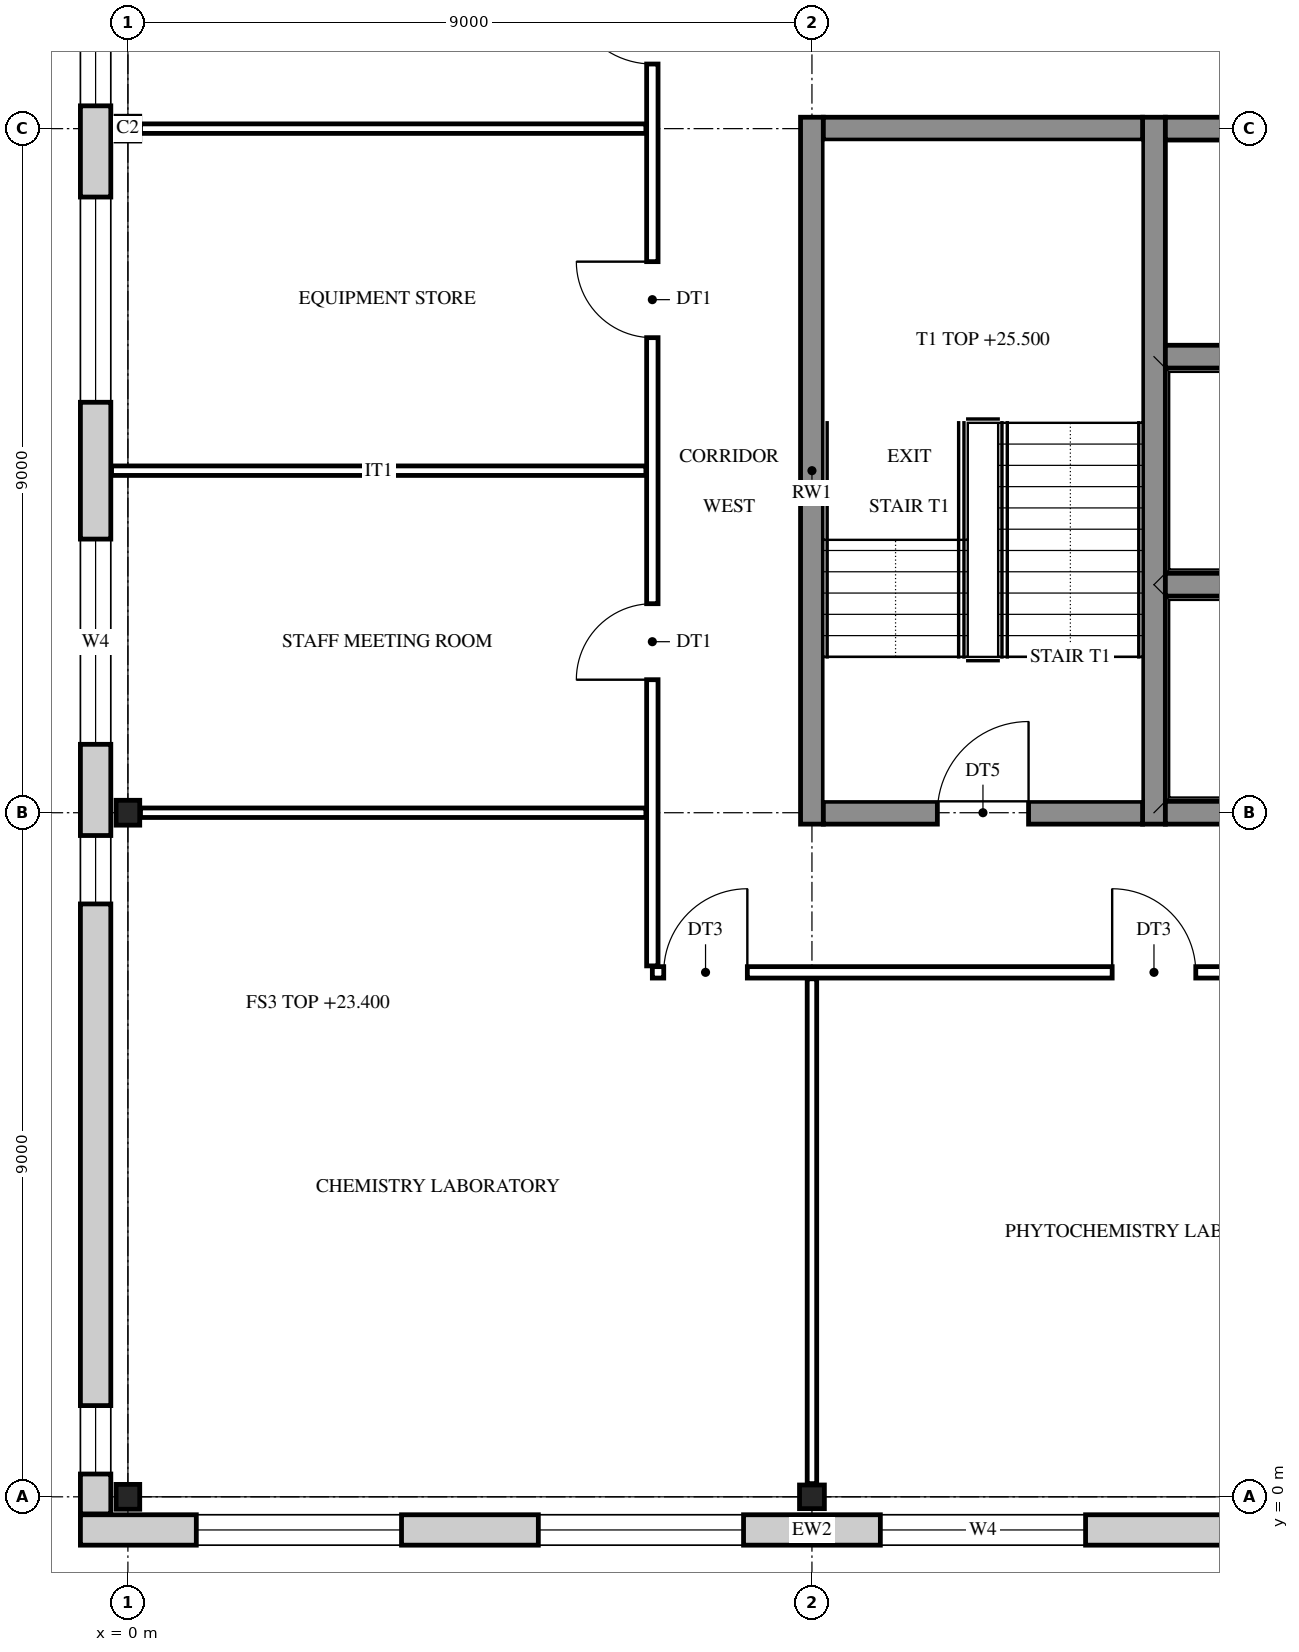
"""IFC4 building model, lengths in metres.
Left out: names, types, materials, properties, quantities, classifications, styles, units other than length and angle.
Written with IfcOpenShell. Run it as: python <this file> out.ifc"""

import sys

from ifc_helpers import new_model, si_unit, direction, frame, frame_2d, origin, origin_2d, place, context, subcontext, project, spatial, rectangle, i_section, extrude, element, fill, save


model = new_model("IFC4")
c1 = context("Model", 3, precision=1e-05, world=origin(), true_north=direction((0.0, 1.0)))
c2 = subcontext(c1, "Body", "Model", "MODEL_VIEW")
j1 = project(units=[si_unit("LENGTHUNIT", "METRE"), si_unit("PLANEANGLEUNIT", "RADIAN")], contexts=[c1])
p1 = place(None, origin())
s1 = spatial("IfcSite", under=j1, at=p1, CompositionType="ELEMENT")
p2 = place(p1, origin())
s2 = spatial("IfcBuilding", under=s1, at=p2, CompositionType="ELEMENT")
p3 = place(p2, frame((0.0, 0.0, 23.4)))
s3 = spatial("IfcBuildingStorey", under=s2, at=p3, CompositionType="ELEMENT", Elevation=23.4)
for number, where, z_axis, x_axis in (
    (1, (0.0, 0.0, 0.0), (0.0, 0.0, 1.0), (1.0, 0.0, 0.0)),
    (2, (0.0, 9.0, 0.0), (0.0, 0.0, 1.0), (1.0, 0.0, 0.0)),
    (3, (0.0, 18.0, 0.0), (0.0, 0.0, 1.0), (1.0, 0.0, 0.0)),
    (4, (9.0, 0.0, 0.0), (0.0, 0.0, 1.0), (0.0, 1.0, 0.0)),
):
    element("IfcColumn", number, at=place(p3, frame(where, z_axis=z_axis, x_axis=x_axis)), inside=s3, PredefinedType="COLUMN", context=c2, shape_type="SweptSolid", body=[
        extrude(i_section(OverallWidth=0.311, OverallDepth=0.327, WebThickness=0.016, FlangeThickness=0.025, FilletRadius=0.017, at=origin_2d()), origin(), (0.0, 0.0, 1.0), 4.2),
    ])
for number, where, z_axis, x_axis in (
    (5, (9.0, 8.85, 0.0), (0.0, 0.0, 1.0), (0.0, 1.0, 0.0)),
    (6, (13.5, 8.85, 0.0), (0.0, 0.0, 1.0), (0.0, 1.0, 0.0)),
):
    element("IfcWall", number, at=place(p3, frame(where, z_axis=z_axis, x_axis=x_axis)), inside=s3, PredefinedType="SHEAR", context=c2, shape_type="SweptSolid", body=[
        extrude(rectangle(XDim=9.3, YDim=0.3, at=frame_2d((4.65, 0.0))), origin(), (0.0, 0.0, 1.0), 4.2),
    ])
p4 = place(p3, frame((9.15, 9.0, 0.0), z_axis=(0.0, 0.0, 1.0), x_axis=(1.0, 0.0, 0.0)))
e7 = element("IfcWall", 7, at=p4, inside=s3, PredefinedType="SHEAR", context=c2, shape_type="SweptSolid", body=[
    extrude(rectangle(XDim=4.2, YDim=0.3, at=frame_2d((2.1, 0.0))), origin(), (0.0, 0.0, 1.0), 4.2),
])
p5 = place(p4, frame((1.5, 0.0, 0.0)))
e8 = element("IfcOpeningElement", 8, at=p5, cuts=e7, PredefinedType="OPENING", context=c2, shape_type="SweptSolid", body=[
    extrude(rectangle(XDim=1.2, YDim=2.1, at=frame_2d((0.6, 1.05))), frame((0.0, 0.16, 0.0), z_axis=(0.0, -1.0, 0.0), x_axis=(1.0, 0.0, 0.0)), (0.0, 0.0, 1.0), 0.32),
])
for number, where, z_axis, x_axis in (
    (9, (13.65, 9.0, 0.0), (0.0, 0.0, 1.0), (1.0, 0.0, 0.0)),
    (10, (13.65, 12.0, 0.0), (0.0, 0.0, 1.0), (1.0, 0.0, 0.0)),
    (11, (13.65, 15.0, 0.0), (0.0, 0.0, 1.0), (1.0, 0.0, 0.0)),
):
    element("IfcWall", number, at=place(p3, frame(where, z_axis=z_axis, x_axis=x_axis)), inside=s3, PredefinedType="SHEAR", context=c2, shape_type="SweptSolid", body=[
        extrude(rectangle(XDim=2.7, YDim=0.3, at=frame_2d((1.35, 0.0))), origin(), (0.0, 0.0, 1.0), 4.2),
    ])
p6 = place(p3, frame((9.15, 18.0, 0.0), z_axis=(0.0, 0.0, 1.0), x_axis=(1.0, 0.0, 0.0)))
e12 = element("IfcWall", 12, at=p6, inside=s3, PredefinedType="SHEAR", context=c2, shape_type="SweptSolid", body=[
    extrude(rectangle(XDim=4.2, YDim=0.3, at=frame_2d((2.1, 0.0))), origin(), (0.0, 0.0, 1.0), 4.2),
])
p7 = place(p3, frame((13.65, 18.0, 0.0), z_axis=(0.0, 0.0, 1.0), x_axis=(1.0, 0.0, 0.0)))
e13 = element("IfcWall", 13, at=p7, inside=s3, PredefinedType="SHEAR", context=c2, shape_type="SweptSolid", body=[
    extrude(rectangle(XDim=2.7, YDim=0.3, at=frame_2d((1.35, 0.0))), origin(), (0.0, 0.0, 1.0), 4.2),
])
p8 = place(p3, frame((32.125, -0.436, 0.0), z_axis=(0.0, 0.0, 1.0), x_axis=(-1.0, 0.0, 0.0)))
e14 = element("IfcWall", 14, at=p8, inside=s3, PredefinedType="STANDARD", context=c2, shape_type="SweptSolid", body=[
    extrude(rectangle(XDim=32.75, YDim=0.4, at=frame_2d((16.375, 0.0))), origin(), (0.0, 0.0, 1.0), 4.2),
])
p9 = place(p8, frame((28.525, 0.0, 0.9)))
e15 = element("IfcOpeningElement", 15, at=p9, cuts=e14, PredefinedType="OPENING", context=c2, shape_type="SweptSolid", body=[
    extrude(rectangle(XDim=2.7, YDim=2.5, at=frame_2d((1.35, 1.25))), frame((0.0, 0.21, 0.0), z_axis=(0.0, -1.0, 0.0), x_axis=(1.0, 0.0, 0.0)), (0.0, 0.0, 1.0), 0.42),
])
p10 = place(p8, frame((24.025, 0.0, 0.9)))
e16 = element("IfcOpeningElement", 16, at=p10, cuts=e14, PredefinedType="OPENING", context=c2, shape_type="SweptSolid", body=[
    extrude(rectangle(XDim=2.7, YDim=2.5, at=frame_2d((1.35, 1.25))), frame((0.0, 0.21, 0.0), z_axis=(0.0, -1.0, 0.0), x_axis=(1.0, 0.0, 0.0)), (0.0, 0.0, 1.0), 0.42),
])
p11 = place(p8, frame((19.525, 0.0, 0.9)))
e17 = element("IfcOpeningElement", 17, at=p11, cuts=e14, PredefinedType="OPENING", context=c2, shape_type="SweptSolid", body=[
    extrude(rectangle(XDim=2.7, YDim=2.5, at=frame_2d((1.35, 1.25))), frame((0.0, 0.21, 0.0), z_axis=(0.0, -1.0, 0.0), x_axis=(1.0, 0.0, 0.0)), (0.0, 0.0, 1.0), 0.42),
])
p12 = place(p8, frame((15.025, 0.0, 0.9)))
e18 = element("IfcOpeningElement", 18, at=p12, cuts=e14, PredefinedType="OPENING", context=c2, shape_type="SweptSolid", body=[
    extrude(rectangle(XDim=2.7, YDim=2.5, at=frame_2d((1.35, 1.25))), frame((0.0, 0.21, 0.0), z_axis=(0.0, -1.0, 0.0), x_axis=(1.0, 0.0, 0.0)), (0.0, 0.0, 1.0), 0.42),
])
p13 = place(p8, frame((10.525, 0.0, 0.9)))
e19 = element("IfcOpeningElement", 19, at=p13, cuts=e14, PredefinedType="OPENING", context=c2, shape_type="SweptSolid", body=[
    extrude(rectangle(XDim=2.7, YDim=2.5, at=frame_2d((1.35, 1.25))), frame((0.0, 0.21, 0.0), z_axis=(0.0, -1.0, 0.0), x_axis=(1.0, 0.0, 0.0)), (0.0, 0.0, 1.0), 0.42),
])
p14 = place(p8, frame((6.025, 0.0, 0.9)))
e20 = element("IfcOpeningElement", 20, at=p14, cuts=e14, PredefinedType="OPENING", context=c2, shape_type="SweptSolid", body=[
    extrude(rectangle(XDim=2.7, YDim=2.5, at=frame_2d((1.35, 1.25))), frame((0.0, 0.21, 0.0), z_axis=(0.0, -1.0, 0.0), x_axis=(1.0, 0.0, 0.0)), (0.0, 0.0, 1.0), 0.42),
])
p15 = place(p8, frame((1.525, 0.0, 0.9)))
e21 = element("IfcOpeningElement", 21, at=p15, cuts=e14, PredefinedType="OPENING", context=c2, shape_type="SweptSolid", body=[
    extrude(rectangle(XDim=2.7, YDim=2.5, at=frame_2d((1.35, 1.25))), frame((0.0, 0.21, 0.0), z_axis=(0.0, -1.0, 0.0), x_axis=(1.0, 0.0, 0.0)), (0.0, 0.0, 1.0), 0.42),
])
p16 = place(p3, frame((-0.425, -0.225, 0.0), z_axis=(0.0, 0.0, 1.0), x_axis=(0.0, 1.0, 0.0)))
e22 = element("IfcWall", 22, at=p16, inside=s3, PredefinedType="STANDARD", context=c2, shape_type="SweptSolid", body=[
    extrude(rectangle(XDim=27.45, YDim=0.4, at=frame_2d((13.725, 0.0))), origin(), (0.0, 0.0, 1.0), 4.2),
])
p17 = place(p16, frame((0.525, 0.0, 0.9)))
e23 = element("IfcOpeningElement", 23, at=p17, cuts=e22, PredefinedType="OPENING", context=c2, shape_type="SweptSolid", body=[
    extrude(rectangle(XDim=0.9, YDim=2.0, at=frame_2d((0.45, 1.0))), frame((0.0, 0.21, 0.0), z_axis=(0.0, -1.0, 0.0), x_axis=(1.0, 0.0, 0.0)), (0.0, 0.0, 1.0), 0.42),
])
p18 = place(p16, frame((8.025, 0.0, 0.9)))
e24 = element("IfcOpeningElement", 24, at=p18, cuts=e22, PredefinedType="OPENING", context=c2, shape_type="SweptSolid", body=[
    extrude(rectangle(XDim=0.9, YDim=2.0, at=frame_2d((0.45, 1.0))), frame((0.0, 0.21, 0.0), z_axis=(0.0, -1.0, 0.0), x_axis=(1.0, 0.0, 0.0)), (0.0, 0.0, 1.0), 0.42),
])
p19 = place(p16, frame((10.125, 0.0, 0.9)))
e25 = element("IfcOpeningElement", 25, at=p19, cuts=e22, PredefinedType="OPENING", context=c2, shape_type="SweptSolid", body=[
    extrude(rectangle(XDim=2.7, YDim=2.5, at=frame_2d((1.35, 1.25))), frame((0.0, 0.21, 0.0), z_axis=(0.0, -1.0, 0.0), x_axis=(1.0, 0.0, 0.0)), (0.0, 0.0, 1.0), 0.42),
])
p20 = place(p16, frame((14.625, 0.0, 0.9)))
e26 = element("IfcOpeningElement", 26, at=p20, cuts=e22, PredefinedType="OPENING", context=c2, shape_type="SweptSolid", body=[
    extrude(rectangle(XDim=2.7, YDim=2.5, at=frame_2d((1.35, 1.25))), frame((0.0, 0.21, 0.0), z_axis=(0.0, -1.0, 0.0), x_axis=(1.0, 0.0, 0.0)), (0.0, 0.0, 1.0), 0.42),
])
p21 = place(p16, frame((18.525, 0.0, 0.9)))
e27 = element("IfcOpeningElement", 27, at=p21, cuts=e22, PredefinedType="OPENING", context=c2, shape_type="SweptSolid", body=[
    extrude(rectangle(XDim=0.9, YDim=2.0, at=frame_2d((0.45, 1.0))), frame((0.0, 0.21, 0.0), z_axis=(0.0, -1.0, 0.0), x_axis=(1.0, 0.0, 0.0)), (0.0, 0.0, 1.0), 0.42),
])
p22 = place(p16, frame((26.025, 0.0, 0.9)))
e28 = element("IfcOpeningElement", 28, at=p22, cuts=e22, PredefinedType="OPENING", context=c2, shape_type="SweptSolid", body=[
    extrude(rectangle(XDim=0.9, YDim=2.0, at=frame_2d((0.45, 1.0))), frame((0.0, 0.21, 0.0), z_axis=(0.0, -1.0, 0.0), x_axis=(1.0, 0.0, 0.0)), (0.0, 0.0, 1.0), 0.42),
])
p23 = place(p3, frame((6.9, 6.985, 0.0), z_axis=(0.0, 0.0, 1.0), x_axis=(0.0, 1.0, 0.0)))
e29 = element("IfcWall", 29, at=p23, inside=s3, PredefinedType="PARTITIONING", context=c2, shape_type="SweptSolid", body=[
    extrude(rectangle(XDim=13.115, YDim=0.15, at=frame_2d((6.558, 0.0))), origin(), (0.0, 0.0, 1.0), 3.537),
])
p24 = place(p23, frame((11.865, 0.0, 0.0)))
e30 = element("IfcOpeningElement", 30, at=p24, cuts=e29, PredefinedType="OPENING", context=c2, shape_type="SweptSolid", body=[
    extrude(rectangle(XDim=1.1, YDim=2.1, at=frame_2d((0.55, 1.05))), frame((0.0, 0.085, 0.0), z_axis=(0.0, -1.0, 0.0), x_axis=(1.0, 0.0, 0.0)), (0.0, 0.0, 1.0), 0.17),
])
p25 = place(p23, frame((3.765, 0.0, 0.0)))
e31 = element("IfcOpeningElement", 31, at=p25, cuts=e29, PredefinedType="OPENING", context=c2, shape_type="SweptSolid", body=[
    extrude(rectangle(XDim=1.0, YDim=2.1, at=frame_2d((0.5, 1.05))), frame((0.0, 0.085, 0.0), z_axis=(0.0, -1.0, 0.0), x_axis=(1.0, 0.0, 0.0)), (0.0, 0.0, 1.0), 0.17),
])
p26 = place(p23, frame((8.265, 0.0, 0.0)))
e32 = element("IfcOpeningElement", 32, at=p26, cuts=e29, PredefinedType="OPENING", context=c2, shape_type="SweptSolid", body=[
    extrude(rectangle(XDim=1.0, YDim=2.1, at=frame_2d((0.5, 1.05))), frame((0.0, 0.085, 0.0), z_axis=(0.0, -1.0, 0.0), x_axis=(1.0, 0.0, 0.0)), (0.0, 0.0, 1.0), 0.17),
])
p27 = place(p3, frame((9.0, 0.174, 0.0), z_axis=(0.0, 0.0, 1.0), x_axis=(0.0, 1.0, 0.0)))
e33 = element("IfcWall", 33, at=p27, inside=s3, PredefinedType="PARTITIONING", context=c2, shape_type="SweptSolid", body=[
    extrude(rectangle(XDim=6.641, YDim=0.125, at=frame_2d((3.321, 0.0))), origin(), (0.0, 0.0, 1.0), 3.537),
])
p28 = place(p3, frame((6.9, 6.9, 0.0), z_axis=(0.0, 0.0, 1.0), x_axis=(1.0, 0.0, 0.0)))
e34 = element("IfcWall", 34, at=p28, inside=s3, PredefinedType="PARTITIONING", context=c2, shape_type="SweptSolid", body=[
    extrude(rectangle(XDim=20.1, YDim=0.15, at=frame_2d((10.05, 0.0))), origin(), (0.0, 0.0, 1.0), 3.537),
])
p29 = place(p28, frame((0.15, 0.0, 0.0)))
e35 = element("IfcOpeningElement", 35, at=p29, cuts=e34, PredefinedType="OPENING", context=c2, shape_type="SweptSolid", body=[
    extrude(rectangle(XDim=1.1, YDim=2.1, at=frame_2d((0.55, 1.05))), frame((0.0, 0.085, 0.0), z_axis=(0.0, -1.0, 0.0), x_axis=(1.0, 0.0, 0.0)), (0.0, 0.0, 1.0), 0.17),
])
p30 = place(p28, frame((6.05, 0.0, 0.0)))
e36 = element("IfcOpeningElement", 36, at=p30, cuts=e34, PredefinedType="OPENING", context=c2, shape_type="SweptSolid", body=[
    extrude(rectangle(XDim=1.1, YDim=2.1, at=frame_2d((0.55, 1.05))), frame((0.0, 0.085, 0.0), z_axis=(0.0, -1.0, 0.0), x_axis=(1.0, 0.0, 0.0)), (0.0, 0.0, 1.0), 0.17),
])
p31 = place(p28, frame((16.25, 0.0, 0.0)))
e37 = element("IfcOpeningElement", 37, at=p31, cuts=e34, PredefinedType="OPENING", context=c2, shape_type="SweptSolid", body=[
    extrude(rectangle(XDim=1.1, YDim=2.1, at=frame_2d((0.55, 1.05))), frame((0.0, 0.085, 0.0), z_axis=(0.0, -1.0, 0.0), x_axis=(1.0, 0.0, 0.0)), (0.0, 0.0, 1.0), 0.17),
])
p32 = place(p3, frame((0.166, 9.0, 0.0), z_axis=(0.0, 0.0, 1.0), x_axis=(1.0, 0.0, 0.0)))
e38 = element("IfcWall", 38, at=p32, inside=s3, PredefinedType="PARTITIONING", context=c2, shape_type="SweptSolid", body=[
    extrude(rectangle(XDim=6.649, YDim=0.125, at=frame_2d((3.325, 0.0))), origin(), (0.0, 0.0, 1.0), 3.537),
])
p33 = place(p3, frame((-0.215, 13.5, 0.0), z_axis=(0.0, 0.0, 1.0), x_axis=(1.0, 0.0, 0.0)))
e39 = element("IfcWall", 39, at=p33, inside=s3, PredefinedType="PARTITIONING", context=c2, shape_type="SweptSolid", body=[
    extrude(rectangle(XDim=7.03, YDim=0.125, at=frame_2d((3.515, 0.0))), origin(), (0.0, 0.0, 1.0), 3.537),
])
p34 = place(p3, frame((0.166, 18.0, 0.0), z_axis=(0.0, 0.0, 1.0), x_axis=(1.0, 0.0, 0.0)))
e40 = element("IfcWall", 40, at=p34, inside=s3, PredefinedType="PARTITIONING", context=c2, shape_type="SweptSolid", body=[
    extrude(rectangle(XDim=6.649, YDim=0.125, at=frame_2d((3.325, 0.0))), origin(), (0.0, 0.0, 1.0), 3.537),
])
p35 = place(p9, origin())
e41 = element("IfcWindow", 41, at=p35, inside=s3, PartitioningType="SINGLE_PANEL", PredefinedType="WINDOW", context=c2, shape_type="SweptSolid", body=[
    extrude(rectangle(XDim=2.7, YDim=2.5, at=frame_2d((1.35, 1.25))), frame((0.0, 0.03, 0.0), z_axis=(0.0, -1.0, 0.0), x_axis=(1.0, 0.0, 0.0)), (0.0, 0.0, 1.0), 0.06),
])
fill(e15, e41)
p36 = place(p10, origin())
e42 = element("IfcWindow", 42, at=p36, inside=s3, PartitioningType="SINGLE_PANEL", PredefinedType="WINDOW", context=c2, shape_type="SweptSolid", body=[
    extrude(rectangle(XDim=2.7, YDim=2.5, at=frame_2d((1.35, 1.25))), frame((0.0, 0.03, 0.0), z_axis=(0.0, -1.0, 0.0), x_axis=(1.0, 0.0, 0.0)), (0.0, 0.0, 1.0), 0.06),
])
fill(e16, e42)
p37 = place(p11, origin())
e43 = element("IfcWindow", 43, at=p37, inside=s3, PartitioningType="SINGLE_PANEL", PredefinedType="WINDOW", context=c2, shape_type="SweptSolid", body=[
    extrude(rectangle(XDim=2.7, YDim=2.5, at=frame_2d((1.35, 1.25))), frame((0.0, 0.03, 0.0), z_axis=(0.0, -1.0, 0.0), x_axis=(1.0, 0.0, 0.0)), (0.0, 0.0, 1.0), 0.06),
])
fill(e17, e43)
p38 = place(p17, origin())
e44 = element("IfcWindow", 44, at=p38, inside=s3, PartitioningType="SINGLE_PANEL", PredefinedType="WINDOW", context=c2, shape_type="SweptSolid", body=[
    extrude(rectangle(XDim=0.9, YDim=2.0, at=frame_2d((0.45, 1.0))), frame((0.0, 0.03, 0.0), z_axis=(0.0, -1.0, 0.0), x_axis=(1.0, 0.0, 0.0)), (0.0, 0.0, 1.0), 0.06),
])
fill(e23, e44)
p39 = place(p18, origin())
e45 = element("IfcWindow", 45, at=p39, inside=s3, PartitioningType="SINGLE_PANEL", PredefinedType="WINDOW", context=c2, shape_type="SweptSolid", body=[
    extrude(rectangle(XDim=0.9, YDim=2.0, at=frame_2d((0.45, 1.0))), frame((0.0, 0.03, 0.0), z_axis=(0.0, -1.0, 0.0), x_axis=(1.0, 0.0, 0.0)), (0.0, 0.0, 1.0), 0.06),
])
fill(e24, e45)
p40 = place(p19, origin())
e46 = element("IfcWindow", 46, at=p40, inside=s3, PartitioningType="SINGLE_PANEL", PredefinedType="WINDOW", context=c2, shape_type="SweptSolid", body=[
    extrude(rectangle(XDim=2.7, YDim=2.5, at=frame_2d((1.35, 1.25))), frame((0.0, 0.03, 0.0), z_axis=(0.0, -1.0, 0.0), x_axis=(1.0, 0.0, 0.0)), (0.0, 0.0, 1.0), 0.06),
])
fill(e25, e46)
p41 = place(p20, origin())
e47 = element("IfcWindow", 47, at=p41, inside=s3, PartitioningType="SINGLE_PANEL", PredefinedType="WINDOW", context=c2, shape_type="SweptSolid", body=[
    extrude(rectangle(XDim=2.7, YDim=2.5, at=frame_2d((1.35, 1.25))), frame((0.0, 0.03, 0.0), z_axis=(0.0, -1.0, 0.0), x_axis=(1.0, 0.0, 0.0)), (0.0, 0.0, 1.0), 0.06),
])
fill(e26, e47)
p42 = place(p21, origin())
e48 = element("IfcWindow", 48, at=p42, inside=s3, PartitioningType="SINGLE_PANEL", PredefinedType="WINDOW", context=c2, shape_type="SweptSolid", body=[
    extrude(rectangle(XDim=0.9, YDim=2.0, at=frame_2d((0.45, 1.0))), frame((0.0, 0.03, 0.0), z_axis=(0.0, -1.0, 0.0), x_axis=(1.0, 0.0, 0.0)), (0.0, 0.0, 1.0), 0.06),
])
fill(e27, e48)
p43 = place(p5, origin())
e49 = element("IfcDoor", 49, at=p43, inside=s3, OperationType="SINGLE_SWING_RIGHT", PredefinedType="DOOR", context=c2, shape_type="SweptSolid", body=[
    extrude(rectangle(XDim=1.2, YDim=2.1, at=frame_2d((0.6, 1.05))), frame((0.0, 0.025, 0.0), z_axis=(0.0, -1.0, 0.0), x_axis=(1.0, 0.0, 0.0)), (0.0, 0.0, 1.0), 0.05),
])
fill(e8, e49)
p44 = place(p29, frame((1.1, 0.0, 0.0), z_axis=(0.0, 0.0, 1.0), x_axis=(-1.0, 0.0, 0.0)))
e50 = element("IfcDoor", 50, at=p44, inside=s3, OperationType="SINGLE_SWING_RIGHT", PredefinedType="DOOR", context=c2, shape_type="SweptSolid", body=[
    extrude(rectangle(XDim=1.1, YDim=2.1, at=frame_2d((0.55, 1.05))), frame((0.0, 0.025, 0.0), z_axis=(0.0, -1.0, 0.0), x_axis=(1.0, 0.0, 0.0)), (0.0, 0.0, 1.0), 0.05),
])
fill(e35, e50)
p45 = place(p30, frame((1.1, 0.0, 0.0), z_axis=(0.0, 0.0, 1.0), x_axis=(-1.0, 0.0, 0.0)))
e51 = element("IfcDoor", 51, at=p45, inside=s3, OperationType="SINGLE_SWING_LEFT", PredefinedType="DOOR", context=c2, shape_type="SweptSolid", body=[
    extrude(rectangle(XDim=1.1, YDim=2.1, at=frame_2d((0.55, 1.05))), frame((0.0, 0.025, 0.0), z_axis=(0.0, -1.0, 0.0), x_axis=(1.0, 0.0, 0.0)), (0.0, 0.0, 1.0), 0.05),
])
fill(e36, e51)
p46 = place(p24, origin())
e52 = element("IfcDoor", 52, at=p46, inside=s3, OperationType="SINGLE_SWING_RIGHT", PredefinedType="DOOR", context=c2, shape_type="SweptSolid", body=[
    extrude(rectangle(XDim=1.1, YDim=2.1, at=frame_2d((0.55, 1.05))), frame((0.0, 0.025, 0.0), z_axis=(0.0, -1.0, 0.0), x_axis=(1.0, 0.0, 0.0)), (0.0, 0.0, 1.0), 0.05),
])
fill(e30, e52)
p47 = place(p25, origin())
e53 = element("IfcDoor", 53, at=p47, inside=s3, OperationType="SINGLE_SWING_LEFT", PredefinedType="DOOR", context=c2, shape_type="SweptSolid", body=[
    extrude(rectangle(XDim=1.0, YDim=2.1, at=frame_2d((0.5, 1.05))), frame((0.0, 0.025, 0.0), z_axis=(0.0, -1.0, 0.0), x_axis=(1.0, 0.0, 0.0)), (0.0, 0.0, 1.0), 0.05),
])
fill(e31, e53)
p48 = place(p26, origin())
e54 = element("IfcDoor", 54, at=p48, inside=s3, OperationType="SINGLE_SWING_RIGHT", PredefinedType="DOOR", context=c2, shape_type="SweptSolid", body=[
    extrude(rectangle(XDim=1.0, YDim=2.1, at=frame_2d((0.5, 1.05))), frame((0.0, 0.025, 0.0), z_axis=(0.0, -1.0, 0.0), x_axis=(1.0, 0.0, 0.0)), (0.0, 0.0, 1.0), 0.05),
])
fill(e32, e54)
save(model, sys.argv[1])
